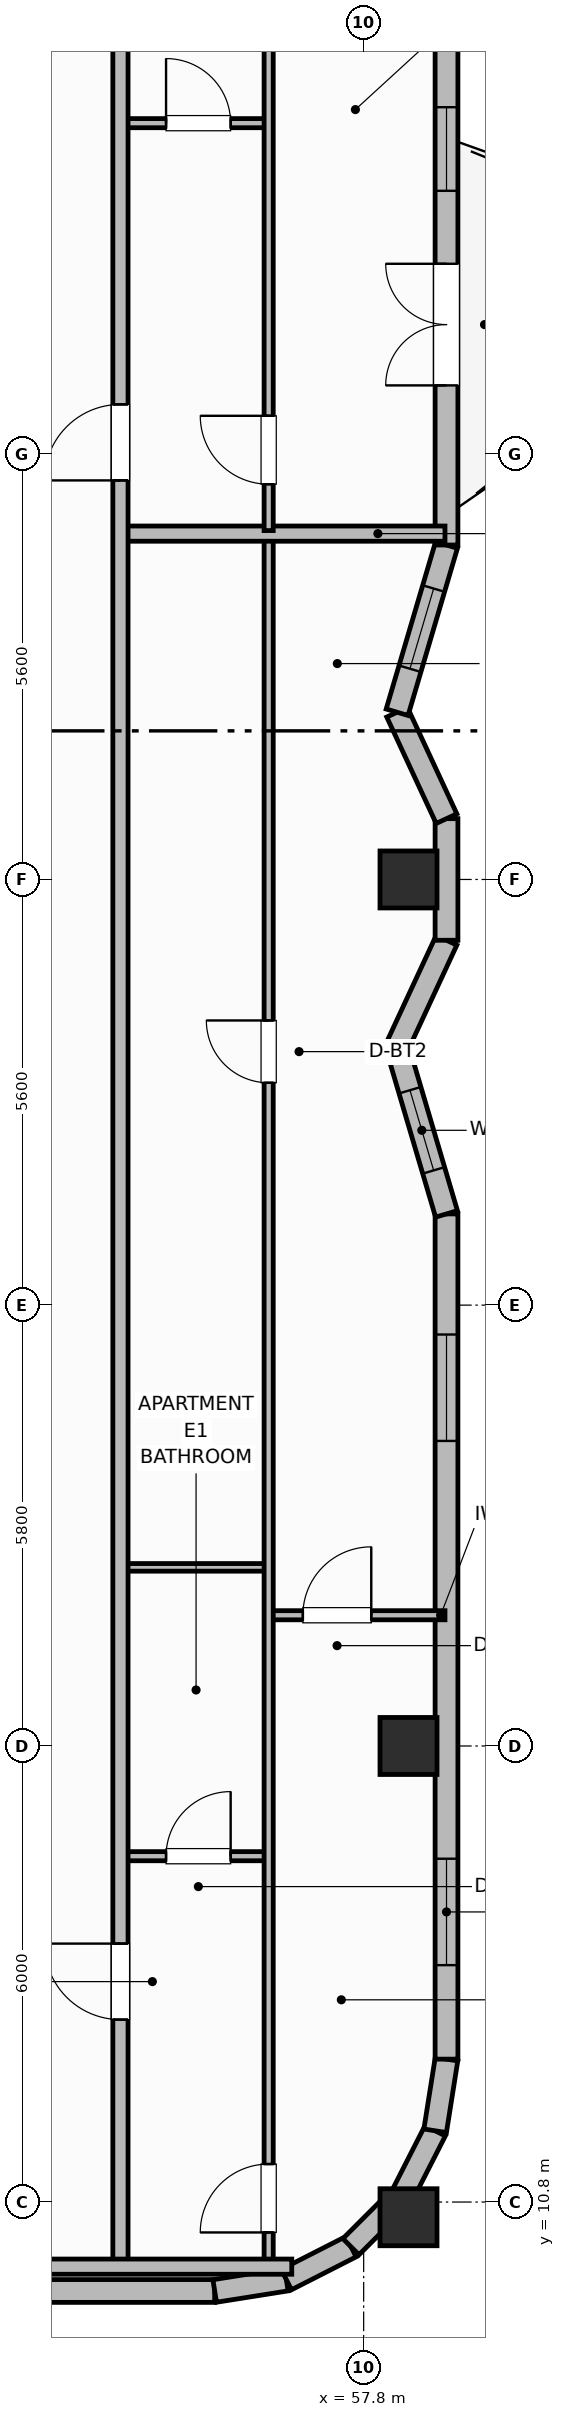
"""IFC4 building model, lengths in metres.
Left out: names, types, materials, properties, quantities, classifications, styles, units other than length and angle.
Written with IfcOpenShell. Run it as: python <this file> out.ifc"""

import sys

from ifc_helpers import new_model, si_unit, direction, frame, frame_2d, origin, origin_2d, place, context, subcontext, project, spatial, rectangle, extrude, element, fill, save


model = new_model("IFC4")
c1 = context("Model", 3, precision=1e-05, world=origin(), true_north=direction((0.0, 1.0)))
c2 = subcontext(c1, "Body", "Model", "MODEL_VIEW")
j1 = project(units=[si_unit("LENGTHUNIT", "METRE"), si_unit("PLANEANGLEUNIT", "RADIAN")], contexts=[c1])
p1 = place(None, origin())
s1 = spatial("IfcSite", under=j1, at=p1, CompositionType="ELEMENT")
p2 = place(p1, origin())
s2 = spatial("IfcBuilding", under=s1, at=p2, CompositionType="ELEMENT")
p3 = place(p2, frame((0.0, 0.0, 282.4)))
s3 = spatial("IfcBuildingStorey", under=s2, at=p3, CompositionType="ELEMENT", Elevation=282.4)
for number, where, z_axis, x_axis in (
    (1, (58.39, 10.6, 0.0), (0.0, 0.0, 1.0), (1.0, 0.0, 0.0)),
    (2, (58.39, 16.8, 0.0), (0.0, 0.0, 1.0), (1.0, 0.0, 0.0)),
    (3, (58.39, 28.2, 0.0), (0.0, 0.0, 1.0), (1.0, 0.0, 0.0)),
):
    element("IfcColumn", number, at=place(p3, frame(where, z_axis=z_axis, x_axis=x_axis)), inside=s3, PredefinedType="COLUMN", context=c2, shape_type="SweptSolid", body=[
        extrude(rectangle(XDim=0.75, YDim=0.75, at=origin_2d()), origin(), (0.0, 0.0, 1.0), 3.7),
    ])
p4 = place(p3, frame((22.56, 9.63, 0.0), z_axis=(0.0, 0.0, 1.0), x_axis=(1.0, 0.0, 0.0)))
e4 = element("IfcWall", 4, at=p4, inside=s3, PredefinedType="SOLIDWALL", context=c2, shape_type="SweptSolid", body=[
    extrude(rectangle(XDim=33.28, YDim=0.3, at=frame_2d((16.64, 0.0))), origin(), (0.0, 0.0, 1.0), 2.73),
])
p5 = place(p4, frame((5.18, 0.0, 0.71)))
e5 = element("IfcOpeningElement", 5, at=p5, cuts=e4, PredefinedType="OPENING", context=c2, shape_type="SweptSolid", body=[
    extrude(rectangle(XDim=1.6, YDim=1.9, at=frame_2d((0.8, 0.95))), frame((0.0, 0.16, 0.0), z_axis=(0.0, -1.0, 0.0), x_axis=(1.0, 0.0, 0.0)), (0.0, 0.0, 1.0), 0.32),
])
p6 = place(p4, frame((8.733, 0.0, 0.71)))
e6 = element("IfcOpeningElement", 6, at=p6, cuts=e4, PredefinedType="OPENING", context=c2, shape_type="SweptSolid", body=[
    extrude(rectangle(XDim=1.6, YDim=1.9, at=frame_2d((0.8, 0.95))), frame((0.0, 0.16, 0.0), z_axis=(0.0, -1.0, 0.0), x_axis=(1.0, 0.0, 0.0)), (0.0, 0.0, 1.0), 0.32),
])
p7 = place(p4, frame((15.84, 0.0, 0.71)))
e7 = element("IfcOpeningElement", 7, at=p7, cuts=e4, PredefinedType="OPENING", context=c2, shape_type="SweptSolid", body=[
    extrude(rectangle(XDim=1.6, YDim=1.9, at=frame_2d((0.8, 0.95))), frame((0.0, 0.16, 0.0), z_axis=(0.0, -1.0, 0.0), x_axis=(1.0, 0.0, 0.0)), (0.0, 0.0, 1.0), 0.32),
])
p8 = place(p4, frame((22.947, 0.0, 0.71)))
e8 = element("IfcOpeningElement", 8, at=p8, cuts=e4, PredefinedType="OPENING", context=c2, shape_type="SweptSolid", body=[
    extrude(rectangle(XDim=1.6, YDim=1.9, at=frame_2d((0.8, 0.95))), frame((0.0, 0.16, 0.0), z_axis=(0.0, -1.0, 0.0), x_axis=(1.0, 0.0, 0.0)), (0.0, 0.0, 1.0), 0.32),
])
p9 = place(p4, frame((26.5, 0.0, 0.71)))
e9 = element("IfcOpeningElement", 9, at=p9, cuts=e4, PredefinedType="OPENING", context=c2, shape_type="SweptSolid", body=[
    extrude(rectangle(XDim=1.6, YDim=1.9, at=frame_2d((0.8, 0.95))), frame((0.0, 0.16, 0.0), z_axis=(0.0, -1.0, 0.0), x_axis=(1.0, 0.0, 0.0)), (0.0, 0.0, 1.0), 0.32),
])
p10 = place(p3, frame((55.84, 9.63, 0.0), z_axis=(0.0, 0.0, 1.0), x_axis=(0.987663181641, 0.156593229835, 0.0)))
e10 = element("IfcWall", 10, at=p10, inside=s3, PredefinedType="SOLIDWALL", context=c2, shape_type="SweptSolid", body=[
    extrude(rectangle(XDim=0.954, YDim=0.3, at=frame_2d((0.477, 0.0))), origin(), (0.0, 0.0, 1.0), 2.73),
])
for number, where, z_axis, x_axis in (
    (11, (56.782, 9.779, 0.0), (0.0, 0.0, 1.0), (0.891, 0.454, 0.0)),
    (12, (57.633, 10.212, 0.0), (0.0, 0.0, 1.0), (0.707, 0.707, 0.0)),
    (13, (58.308, 10.887, 0.0), (0.0, 0.0, 1.0), (0.454, 0.891, 0.0)),
):
    element("IfcWall", number, at=place(p3, frame(where, z_axis=z_axis, x_axis=x_axis)), inside=s3, PredefinedType="SOLIDWALL", context=c2, shape_type="SweptSolid", body=[
        extrude(rectangle(XDim=0.954, YDim=0.3, at=frame_2d((0.477, 0.0))), origin(), (0.0, 0.0, 1.0), 2.73),
    ])
p11 = place(p3, frame((58.741, 11.738, 0.0), z_axis=(0.0, 0.0, 1.0), x_axis=(0.156343617883, 0.987702725088, 0.0)))
e14 = element("IfcWall", 14, at=p11, inside=s3, PredefinedType="SOLIDWALL", context=c2, shape_type="SweptSolid", body=[
    extrude(rectangle(XDim=0.954, YDim=0.3, at=frame_2d((0.477, 0.0))), origin(), (0.0, 0.0, 1.0), 2.73),
])
p12 = place(p3, frame((58.89, 12.68, 0.0), z_axis=(0.0, 0.0, 1.0), x_axis=(0.0, 1.0, 0.0)))
e15 = element("IfcWall", 15, at=p12, inside=s3, PredefinedType="SOLIDWALL", context=c2, shape_type="SweptSolid", body=[
    extrude(rectangle(XDim=11.12, YDim=0.3, at=frame_2d((5.56, 0.0))), origin(), (0.0, 0.0, 1.0), 2.73),
])
p13 = place(p12, frame((1.237, 0.0, 0.76)))
e16 = element("IfcOpeningElement", 16, at=p13, cuts=e15, PredefinedType="OPENING", context=c2, shape_type="SweptSolid", body=[
    extrude(rectangle(XDim=1.4, YDim=1.85, at=frame_2d((0.7, 0.925))), frame((0.0, 0.16, 0.0), z_axis=(0.0, -1.0, 0.0), x_axis=(1.0, 0.0, 0.0)), (0.0, 0.0, 1.0), 0.32),
])
p14 = place(p12, frame((8.133, 0.0, 0.76)))
e17 = element("IfcOpeningElement", 17, at=p14, cuts=e15, PredefinedType="OPENING", context=c2, shape_type="SweptSolid", body=[
    extrude(rectangle(XDim=1.4, YDim=1.85, at=frame_2d((0.7, 0.925))), frame((0.0, 0.16, 0.0), z_axis=(0.0, -1.0, 0.0), x_axis=(1.0, 0.0, 0.0)), (0.0, 0.0, 1.0), 0.32),
])
p15 = place(p3, frame((58.89, 23.8, 0.0), z_axis=(0.0, 0.0, 1.0), x_axis=(-0.283312771328, 0.959027566654, 0.0)))
e18 = element("IfcWall", 18, at=p15, inside=s3, PredefinedType="SOLIDWALL", context=c2, shape_type="SweptSolid", body=[
    extrude(rectangle(XDim=2.294, YDim=0.3, at=frame_2d((1.147, 0.0))), origin(), (0.0, 0.0, 1.0), 2.73),
])
p16 = place(p15, frame((0.597, 0.0, 0.92)))
e19 = element("IfcOpeningElement", 19, at=p16, cuts=e18, PredefinedType="OPENING", context=c2, shape_type="SweptSolid", body=[
    extrude(rectangle(XDim=1.1, YDim=1.65, at=frame_2d((0.55, 0.825))), frame((0.0, 0.16, 0.0), z_axis=(0.0, -1.0, 0.0), x_axis=(1.0, 0.0, 0.0)), (0.0, 0.0, 1.0), 0.32),
])
p17 = place(p3, frame((58.24, 26.0, 0.0), z_axis=(0.0, 0.0, 1.0), x_axis=(0.421083420882, 0.907021914101, 0.0)))
e20 = element("IfcWall", 20, at=p17, inside=s3, PredefinedType="SOLIDWALL", context=c2, shape_type="SweptSolid", body=[
    extrude(rectangle(XDim=1.543, YDim=0.3, at=frame_2d((0.772, 0.0))), origin(), (0.0, 0.0, 1.0), 2.73),
])
p18 = place(p3, frame((58.89, 27.4, 0.0), z_axis=(0.0, 0.0, 1.0), x_axis=(0.0, 1.0, 0.0)))
e21 = element("IfcWall", 21, at=p18, inside=s3, PredefinedType="SOLIDWALL", context=c2, shape_type="SweptSolid", body=[
    extrude(rectangle(XDim=1.6, YDim=0.3, at=frame_2d((0.8, 0.0))), origin(), (0.0, 0.0, 1.0), 2.73),
])
p19 = place(p3, frame((58.89, 29.0, 0.0), z_axis=(0.0, 0.0, 1.0), x_axis=(-0.421083420882, 0.907021914101, 0.0)))
e22 = element("IfcWall", 22, at=p19, inside=s3, PredefinedType="SOLIDWALL", context=c2, shape_type="SweptSolid", body=[
    extrude(rectangle(XDim=1.543, YDim=0.3, at=frame_2d((0.772, 0.0))), origin(), (0.0, 0.0, 1.0), 2.73),
])
p20 = place(p3, frame((58.24, 30.4, 0.0), z_axis=(0.0, 0.0, 1.0), x_axis=(0.28328385701, 0.959036107953, 0.0)))
e23 = element("IfcWall", 23, at=p20, inside=s3, PredefinedType="SOLIDWALL", context=c2, shape_type="SweptSolid", body=[
    extrude(rectangle(XDim=2.294, YDim=0.3, at=frame_2d((1.147, 0.0))), origin(), (0.0, 0.0, 1.0), 2.73),
])
p21 = place(p20, frame((0.597, 0.0, 0.92)))
e24 = element("IfcOpeningElement", 24, at=p21, cuts=e23, PredefinedType="OPENING", context=c2, shape_type="SweptSolid", body=[
    extrude(rectangle(XDim=1.1, YDim=1.65, at=frame_2d((0.55, 0.825))), frame((0.0, 0.16, 0.0), z_axis=(0.0, -1.0, 0.0), x_axis=(1.0, 0.0, 0.0)), (0.0, 0.0, 1.0), 0.32),
])
p22 = place(p3, frame((58.89, 32.6, 0.0), z_axis=(0.0, 0.0, 1.0), x_axis=(0.0, 1.0, 0.0)))
e25 = element("IfcWall", 25, at=p22, inside=s3, PredefinedType="SOLIDWALL", context=c2, shape_type="SweptSolid", body=[
    extrude(rectangle(XDim=11.12, YDim=0.3, at=frame_2d((5.56, 0.0))), origin(), (0.0, 0.0, 1.0), 2.73),
])
p23 = place(p22, frame((2.1, 0.0, 0.0)))
e26 = element("IfcOpeningElement", 26, at=p23, cuts=e25, PredefinedType="OPENING", context=c2, shape_type="SweptSolid", body=[
    extrude(rectangle(XDim=1.6, YDim=2.1, at=frame_2d((0.8, 1.05))), frame((0.0, 0.16, 0.0), z_axis=(0.0, -1.0, 0.0), x_axis=(1.0, 0.0, 0.0)), (0.0, 0.0, 1.0), 0.32),
])
p24 = place(p22, frame((4.66, 0.0, 0.95)))
e27 = element("IfcOpeningElement", 27, at=p24, cuts=e25, PredefinedType="OPENING", context=c2, shape_type="SweptSolid", body=[
    extrude(rectangle(XDim=1.1, YDim=1.65, at=frame_2d((0.55, 0.825))), frame((0.0, 0.16, 0.0), z_axis=(0.0, -1.0, 0.0), x_axis=(1.0, 0.0, 0.0)), (0.0, 0.0, 1.0), 0.32),
])
p25 = place(p22, frame((8.983, 0.0, 0.95)))
e28 = element("IfcOpeningElement", 28, at=p25, cuts=e25, PredefinedType="OPENING", context=c2, shape_type="SweptSolid", body=[
    extrude(rectangle(XDim=1.1, YDim=1.65, at=frame_2d((0.55, 0.825))), frame((0.0, 0.16, 0.0), z_axis=(0.0, -1.0, 0.0), x_axis=(1.0, 0.0, 0.0)), (0.0, 0.0, 1.0), 0.32),
])
p26 = place(p3, frame((54.6, 15.35, 0.0), z_axis=(0.0, 0.0, 1.0), x_axis=(1.0, 0.0, 0.0)))
e29 = element("IfcWall", 29, at=p26, inside=s3, PredefinedType="PARTITIONING", context=c2, shape_type="SweptSolid", body=[
    extrude(rectangle(XDim=1.95, YDim=0.12, at=frame_2d((0.975, 0.0))), origin(), (0.0, 0.0, 1.0), 2.56),
])
p27 = place(p26, frame((0.6, 0.0, 0.0)))
e30 = element("IfcOpeningElement", 30, at=p27, cuts=e29, PredefinedType="OPENING", context=c2, shape_type="SweptSolid", body=[
    extrude(rectangle(XDim=0.85, YDim=2.1, at=frame_2d((0.425, 1.05))), frame((0.0, 0.07, 0.0), z_axis=(0.0, -1.0, 0.0), x_axis=(1.0, 0.0, 0.0)), (0.0, 0.0, 1.0), 0.14),
])
p28 = place(p3, frame((54.6, 19.15, 0.0), z_axis=(0.0, 0.0, 1.0), x_axis=(1.0, 0.0, 0.0)))
e31 = element("IfcWall", 31, at=p28, inside=s3, PredefinedType="PARTITIONING", context=c2, shape_type="SweptSolid", body=[
    extrude(rectangle(XDim=1.95, YDim=0.1, at=frame_2d((0.975, 0.0))), origin(), (0.0, 0.0, 1.0), 2.56),
])
p29 = place(p3, frame((56.55, 18.52, 0.0), z_axis=(0.0, 0.0, 1.0), x_axis=(1.0, 0.0, 0.0)))
e32 = element("IfcWall", 32, at=p29, inside=s3, PredefinedType="PARTITIONING", context=c2, shape_type="SweptSolid", body=[
    extrude(rectangle(XDim=2.32, YDim=0.12, at=frame_2d((1.16, 0.0))), origin(), (0.0, 0.0, 1.0), 2.56),
])
p30 = place(p29, frame((0.45, 0.0, 0.0)))
e33 = element("IfcOpeningElement", 33, at=p30, cuts=e32, PredefinedType="OPENING", context=c2, shape_type="SweptSolid", body=[
    extrude(rectangle(XDim=0.9, YDim=2.1, at=frame_2d((0.45, 1.05))), frame((0.0, 0.07, 0.0), z_axis=(0.0, -1.0, 0.0), x_axis=(1.0, 0.0, 0.0)), (0.0, 0.0, 1.0), 0.14),
])
p31 = place(p3, frame((56.55, 9.99, 0.0), z_axis=(0.0, 0.0, 1.0), x_axis=(0.0, 1.0, 0.0)))
e34 = element("IfcWall", 34, at=p31, inside=s3, PredefinedType="PARTITIONING", context=c2, shape_type="SweptSolid", body=[
    extrude(rectangle(XDim=22.72, YDim=0.12, at=frame_2d((11.36, 0.0))), origin(), (0.0, 0.0, 1.0), 2.56),
])
p32 = place(p31, frame((0.41, 0.0, 0.0)))
e35 = element("IfcOpeningElement", 35, at=p32, cuts=e34, PredefinedType="OPENING", context=c2, shape_type="SweptSolid", body=[
    extrude(rectangle(XDim=0.9, YDim=2.1, at=frame_2d((0.45, 1.05))), frame((0.0, 0.07, 0.0), z_axis=(0.0, -1.0, 0.0), x_axis=(1.0, 0.0, 0.0)), (0.0, 0.0, 1.0), 0.14),
])
p33 = place(p31, frame((15.535, 0.0, 0.0)))
e36 = element("IfcOpeningElement", 36, at=p33, cuts=e34, PredefinedType="OPENING", context=c2, shape_type="SweptSolid", body=[
    extrude(rectangle(XDim=0.82, YDim=2.08, at=frame_2d((0.41, 1.04))), frame((0.0, 0.07, 0.0), z_axis=(0.0, -1.0, 0.0), x_axis=(1.0, 0.0, 0.0)), (0.0, 0.0, 1.0), 0.14),
])
p34 = place(p3, frame((54.6, 32.75, 0.0), z_axis=(0.0, 0.0, 1.0), x_axis=(1.0, 0.0, 0.0)))
e37 = element("IfcWall", 37, at=p34, inside=s3, PredefinedType="PARTITIONING", context=c2, shape_type="SweptSolid", body=[
    extrude(rectangle(XDim=4.27, YDim=0.2, at=frame_2d((2.135, 0.0))), origin(), (0.0, 0.0, 1.0), 2.56),
])
p35 = place(p3, frame((54.6, 38.15, 0.0), z_axis=(0.0, 0.0, 1.0), x_axis=(1.0, 0.0, 0.0)))
e38 = element("IfcWall", 38, at=p35, inside=s3, PredefinedType="PARTITIONING", context=c2, shape_type="SweptSolid", body=[
    extrude(rectangle(XDim=1.95, YDim=0.12, at=frame_2d((0.975, 0.0))), origin(), (0.0, 0.0, 1.0), 2.56),
])
p36 = place(p35, frame((0.6, 0.0, 0.0)))
e39 = element("IfcOpeningElement", 39, at=p36, cuts=e38, PredefinedType="OPENING", context=c2, shape_type="SweptSolid", body=[
    extrude(rectangle(XDim=0.85, YDim=2.1, at=frame_2d((0.425, 1.05))), frame((0.0, 0.07, 0.0), z_axis=(0.0, -1.0, 0.0), x_axis=(1.0, 0.0, 0.0)), (0.0, 0.0, 1.0), 0.14),
])
p37 = place(p3, frame((56.55, 32.79, 0.0), z_axis=(0.0, 0.0, 1.0), x_axis=(0.0, 1.0, 0.0)))
e40 = element("IfcWall", 40, at=p37, inside=s3, PredefinedType="PARTITIONING", context=c2, shape_type="SweptSolid", body=[
    extrude(rectangle(XDim=13.62, YDim=0.12, at=frame_2d((6.81, 0.0))), origin(), (0.0, 0.0, 1.0), 2.56),
])
p38 = place(p37, frame((0.61, 0.0, 0.0)))
e41 = element("IfcOpeningElement", 41, at=p38, cuts=e40, PredefinedType="OPENING", context=c2, shape_type="SweptSolid", body=[
    extrude(rectangle(XDim=0.9, YDim=2.1, at=frame_2d((0.45, 1.05))), frame((0.0, 0.07, 0.0), z_axis=(0.0, -1.0, 0.0), x_axis=(1.0, 0.0, 0.0)), (0.0, 0.0, 1.0), 0.14),
])
p39 = place(p37, frame((10.985, 0.0, 0.0)))
e42 = element("IfcOpeningElement", 42, at=p39, cuts=e40, PredefinedType="OPENING", context=c2, shape_type="SweptSolid", body=[
    extrude(rectangle(XDim=0.82, YDim=2.08, at=frame_2d((0.41, 1.04))), frame((0.0, 0.07, 0.0), z_axis=(0.0, -1.0, 0.0), x_axis=(1.0, 0.0, 0.0)), (0.0, 0.0, 1.0), 0.14),
])
p40 = place(p3, frame((54.6, 9.95, 0.0), z_axis=(0.0, 0.0, 1.0), x_axis=(0.0, 1.0, 0.0)))
e43 = element("IfcWall", 43, at=p40, inside=s3, PredefinedType="PARTITIONING", context=c2, shape_type="SweptSolid", body=[
    extrude(rectangle(XDim=36.5, YDim=0.2, at=frame_2d((18.25, 0.0))), origin(), (0.0, 0.0, 1.0), 2.56),
])
p41 = place(p40, frame((3.25, 0.0, 0.0)))
e44 = element("IfcOpeningElement", 44, at=p41, cuts=e43, PredefinedType="OPENING", context=c2, shape_type="SweptSolid", body=[
    extrude(rectangle(XDim=1.0, YDim=2.15, at=frame_2d((0.5, 1.075))), frame((0.0, 0.11, 0.0), z_axis=(0.0, -1.0, 0.0), x_axis=(1.0, 0.0, 0.0)), (0.0, 0.0, 1.0), 0.22),
])
p42 = place(p40, frame((23.5, 0.0, 0.0)))
e45 = element("IfcOpeningElement", 45, at=p42, cuts=e43, PredefinedType="OPENING", context=c2, shape_type="SweptSolid", body=[
    extrude(rectangle(XDim=1.0, YDim=2.15, at=frame_2d((0.5, 1.075))), frame((0.0, 0.11, 0.0), z_axis=(0.0, -1.0, 0.0), x_axis=(1.0, 0.0, 0.0)), (0.0, 0.0, 1.0), 0.22),
])
p43 = place(p3, frame((53.1, 9.95, 0.0), z_axis=(0.0, 0.0, 1.0), x_axis=(1.0, 0.0, 0.0)))
e46 = element("IfcWall", 46, at=p43, inside=s3, PredefinedType="PARTITIONING", context=c2, shape_type="SweptSolid", body=[
    extrude(rectangle(XDim=3.754, YDim=0.2, at=frame_2d((1.877, 0.0))), origin(), (0.0, 0.0, 1.0), 2.56),
])
p44 = place(p13, origin())
e47 = element("IfcWindow", 47, at=p44, inside=s3, PartitioningType="SINGLE_PANEL", PredefinedType="WINDOW", context=c2, shape_type="SweptSolid", body=[
    extrude(rectangle(XDim=1.4, YDim=1.85, at=frame_2d((0.7, 0.925))), frame((0.0, 0.03, 0.0), z_axis=(0.0, -1.0, 0.0), x_axis=(1.0, 0.0, 0.0)), (0.0, 0.0, 1.0), 0.06),
])
fill(e16, e47)
p45 = place(p14, origin())
e48 = element("IfcWindow", 48, at=p45, inside=s3, PartitioningType="SINGLE_PANEL", PredefinedType="WINDOW", context=c2, shape_type="SweptSolid", body=[
    extrude(rectangle(XDim=1.4, YDim=1.85, at=frame_2d((0.7, 0.925))), frame((0.0, 0.03, 0.0), z_axis=(0.0, -1.0, 0.0), x_axis=(1.0, 0.0, 0.0)), (0.0, 0.0, 1.0), 0.06),
])
fill(e17, e48)
p46 = place(p16, origin())
e49 = element("IfcWindow", 49, at=p46, inside=s3, PartitioningType="SINGLE_PANEL", PredefinedType="WINDOW", context=c2, shape_type="SweptSolid", body=[
    extrude(rectangle(XDim=1.1, YDim=1.65, at=frame_2d((0.55, 0.825))), frame((0.0, 0.03, 0.0), z_axis=(0.0, -1.0, 0.0), x_axis=(1.0, 0.0, 0.0)), (0.0, 0.0, 1.0), 0.06),
])
fill(e19, e49)
p47 = place(p21, origin())
e50 = element("IfcWindow", 50, at=p47, inside=s3, PartitioningType="SINGLE_PANEL", PredefinedType="WINDOW", context=c2, shape_type="SweptSolid", body=[
    extrude(rectangle(XDim=1.1, YDim=1.65, at=frame_2d((0.55, 0.825))), frame((0.0, 0.03, 0.0), z_axis=(0.0, -1.0, 0.0), x_axis=(1.0, 0.0, 0.0)), (0.0, 0.0, 1.0), 0.06),
])
fill(e24, e50)
p48 = place(p23, origin())
e51 = element("IfcDoor", 51, at=p48, inside=s3, OperationType="DOUBLE_DOOR_SINGLE_SWING", PredefinedType="DOOR", context=c2, shape_type="SweptSolid", body=[
    extrude(rectangle(XDim=1.6, YDim=2.1, at=frame_2d((0.8, 1.05))), frame((0.0, 0.025, 0.0), z_axis=(0.0, -1.0, 0.0), x_axis=(1.0, 0.0, 0.0)), (0.0, 0.0, 1.0), 0.05),
])
fill(e26, e51)
p49 = place(p24, origin())
e52 = element("IfcWindow", 52, at=p49, inside=s3, PartitioningType="SINGLE_PANEL", PredefinedType="WINDOW", context=c2, shape_type="SweptSolid", body=[
    extrude(rectangle(XDim=1.1, YDim=1.65, at=frame_2d((0.55, 0.825))), frame((0.0, 0.03, 0.0), z_axis=(0.0, -1.0, 0.0), x_axis=(1.0, 0.0, 0.0)), (0.0, 0.0, 1.0), 0.06),
])
fill(e27, e52)
p50 = place(p27, origin())
e53 = element("IfcDoor", 53, at=p50, inside=s3, OperationType="SINGLE_SWING_RIGHT", PredefinedType="DOOR", context=c2, shape_type="SweptSolid", body=[
    extrude(rectangle(XDim=0.85, YDim=2.1, at=frame_2d((0.425, 1.05))), frame((0.0, 0.025, 0.0), z_axis=(0.0, -1.0, 0.0), x_axis=(1.0, 0.0, 0.0)), (0.0, 0.0, 1.0), 0.05),
])
fill(e30, e53)
p51 = place(p30, origin())
e54 = element("IfcDoor", 54, at=p51, inside=s3, OperationType="SINGLE_SWING_RIGHT", PredefinedType="DOOR", context=c2, shape_type="SweptSolid", body=[
    extrude(rectangle(XDim=0.9, YDim=2.1, at=frame_2d((0.45, 1.05))), frame((0.0, 0.025, 0.0), z_axis=(0.0, -1.0, 0.0), x_axis=(1.0, 0.0, 0.0)), (0.0, 0.0, 1.0), 0.05),
])
fill(e33, e54)
p52 = place(p32, origin())
e55 = element("IfcDoor", 55, at=p52, inside=s3, OperationType="SINGLE_SWING_LEFT", PredefinedType="DOOR", context=c2, shape_type="SweptSolid", body=[
    extrude(rectangle(XDim=0.9, YDim=2.1, at=frame_2d((0.45, 1.05))), frame((0.0, 0.025, 0.0), z_axis=(0.0, -1.0, 0.0), x_axis=(1.0, 0.0, 0.0)), (0.0, 0.0, 1.0), 0.05),
])
fill(e35, e55)
p53 = place(p33, origin())
e56 = element("IfcDoor", 56, at=p53, inside=s3, OperationType="SINGLE_SWING_RIGHT", PredefinedType="DOOR", context=c2, shape_type="SweptSolid", body=[
    extrude(rectangle(XDim=0.82, YDim=2.08, at=frame_2d((0.41, 1.04))), frame((0.0, 0.025, 0.0), z_axis=(0.0, -1.0, 0.0), x_axis=(1.0, 0.0, 0.0)), (0.0, 0.0, 1.0), 0.05),
])
fill(e36, e56)
p54 = place(p36, origin())
e57 = element("IfcDoor", 57, at=p54, inside=s3, OperationType="SINGLE_SWING_LEFT", PredefinedType="DOOR", context=c2, shape_type="SweptSolid", body=[
    extrude(rectangle(XDim=0.85, YDim=2.1, at=frame_2d((0.425, 1.05))), frame((0.0, 0.025, 0.0), z_axis=(0.0, -1.0, 0.0), x_axis=(1.0, 0.0, 0.0)), (0.0, 0.0, 1.0), 0.05),
])
fill(e39, e57)
p55 = place(p38, origin())
e58 = element("IfcDoor", 58, at=p55, inside=s3, OperationType="SINGLE_SWING_RIGHT", PredefinedType="DOOR", context=c2, shape_type="SweptSolid", body=[
    extrude(rectangle(XDim=0.9, YDim=2.1, at=frame_2d((0.45, 1.05))), frame((0.0, 0.025, 0.0), z_axis=(0.0, -1.0, 0.0), x_axis=(1.0, 0.0, 0.0)), (0.0, 0.0, 1.0), 0.05),
])
fill(e41, e58)
p56 = place(p41, origin())
e59 = element("IfcDoor", 59, at=p56, inside=s3, OperationType="SINGLE_SWING_RIGHT", PredefinedType="DOOR", context=c2, shape_type="SweptSolid", body=[
    extrude(rectangle(XDim=1.0, YDim=2.15, at=frame_2d((0.5, 1.075))), frame((0.0, 0.025, 0.0), z_axis=(0.0, -1.0, 0.0), x_axis=(1.0, 0.0, 0.0)), (0.0, 0.0, 1.0), 0.05),
])
fill(e44, e59)
p57 = place(p42, origin())
e60 = element("IfcDoor", 60, at=p57, inside=s3, OperationType="SINGLE_SWING_LEFT", PredefinedType="DOOR", context=c2, shape_type="SweptSolid", body=[
    extrude(rectangle(XDim=1.0, YDim=2.15, at=frame_2d((0.5, 1.075))), frame((0.0, 0.025, 0.0), z_axis=(0.0, -1.0, 0.0), x_axis=(1.0, 0.0, 0.0)), (0.0, 0.0, 1.0), 0.05),
])
fill(e45, e60)
save(model, sys.argv[1])
